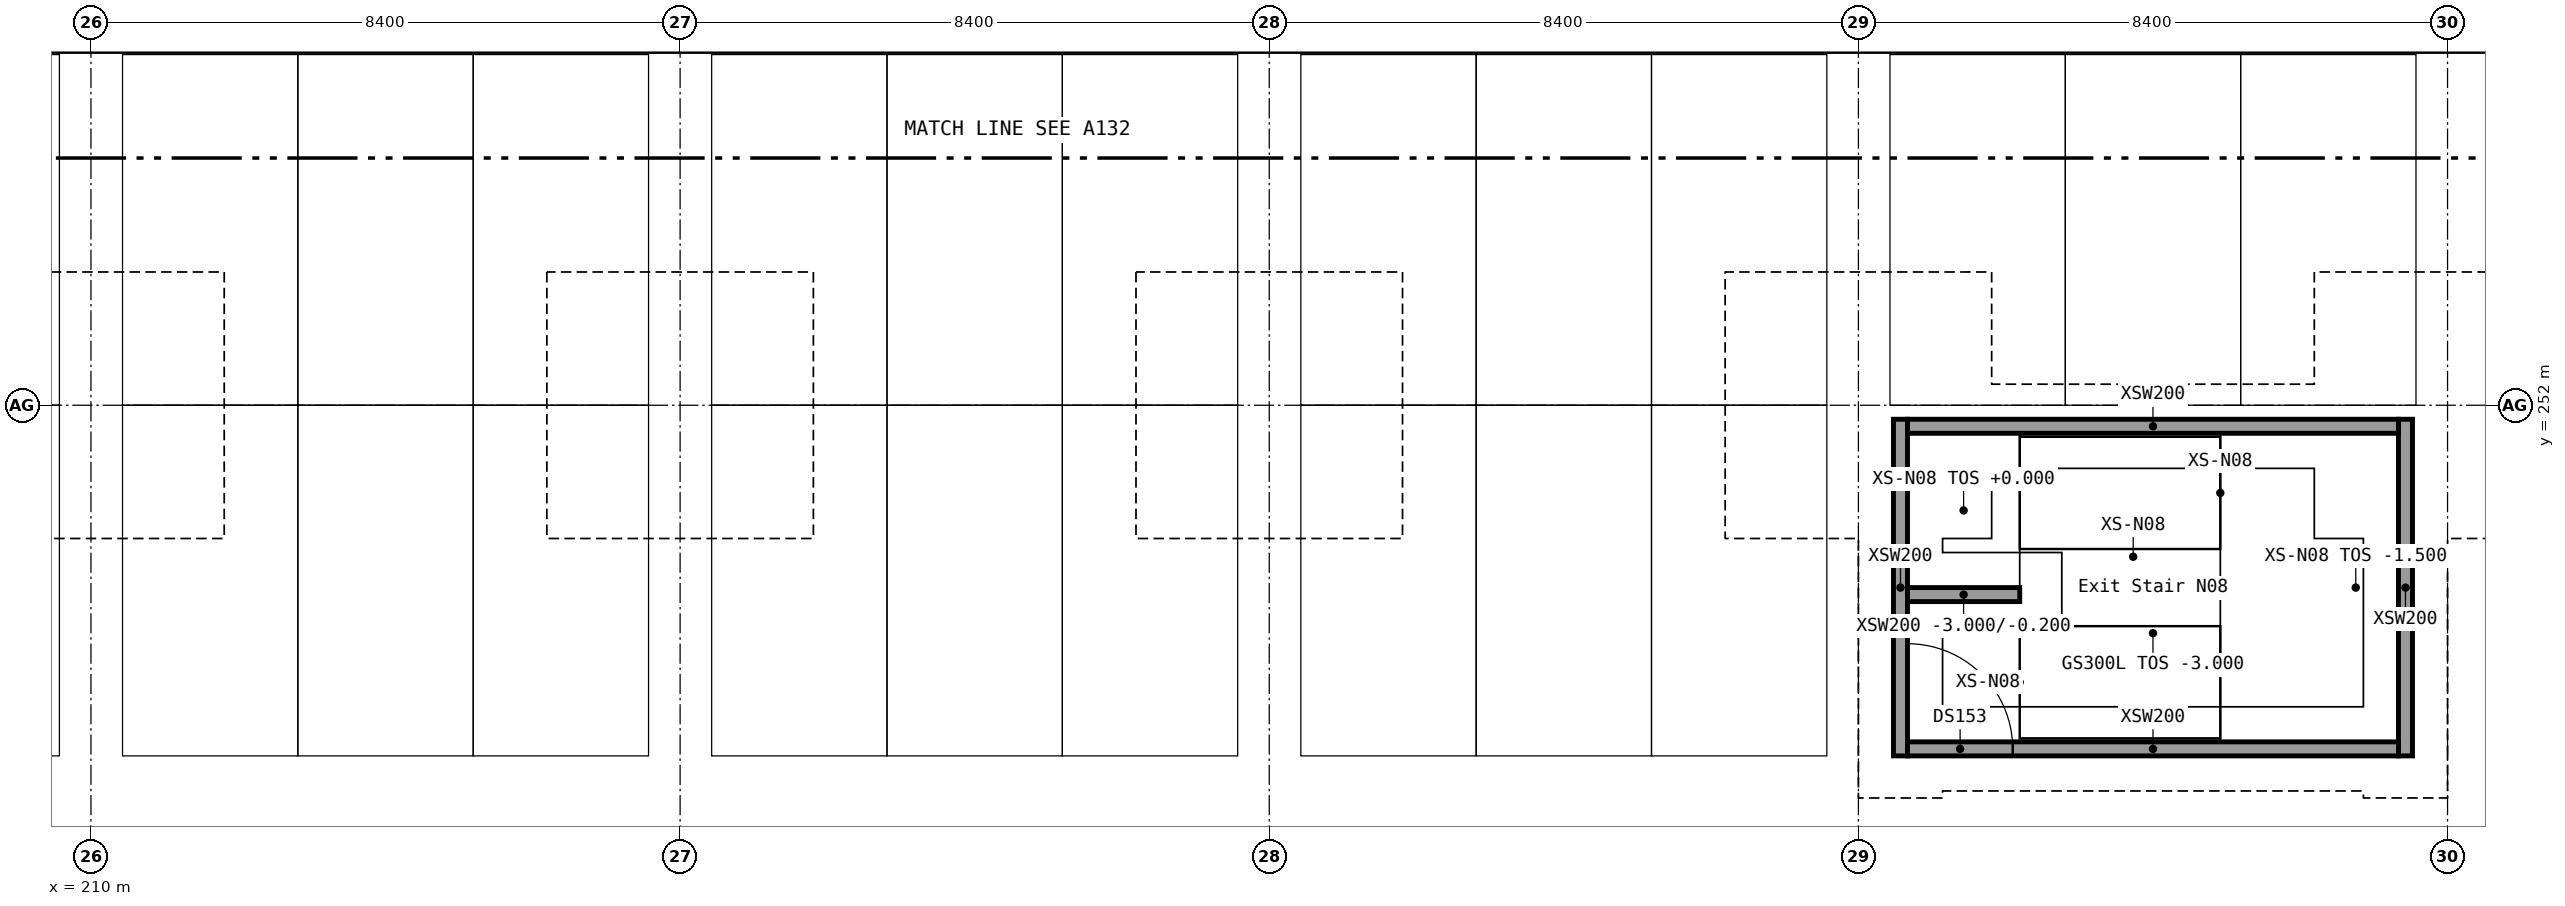
"""IFC4 building model, lengths in metres.
Left out: names, types, materials, properties, quantities, classifications, styles, units other than length and angle.
Written with IfcOpenShell. Run it as: python <this file> out.ifc"""

import sys

from ifc_helpers import new_model, si_unit, direction, frame, frame_2d, origin, origin_2d, place, context, subcontext, project, spatial, rectangle, extrude, element, fill, save


model = new_model("IFC4")
c1 = context("Model", 3, precision=1e-05, world=origin(), true_north=direction((0.0, 1.0)))
c2 = subcontext(c1, "Body", "Model", "MODEL_VIEW")
j1 = project(units=[si_unit("LENGTHUNIT", "METRE"), si_unit("PLANEANGLEUNIT", "RADIAN")], contexts=[c1])
p1 = place(None, origin())
s1 = spatial("IfcSite", under=j1, at=p1, CompositionType="ELEMENT")
p2 = place(p1, origin())
s2 = spatial("IfcBuilding", under=s1, at=p2, CompositionType="ELEMENT")
p3 = place(p2, frame((0.0, 0.0, -3.0)))
s3 = spatial("IfcBuildingStorey", under=s2, at=p3, CompositionType="ELEMENT", Elevation=-3.0)
for number, where, z_axis, x_axis in (
    (1, (235.8, 247.0, 0.0), (0.0, 0.0, 1.0), (0.0, 1.0, 0.0)),
    (2, (243.0, 247.0, 0.0), (0.0, 0.0, 1.0), (0.0, 1.0, 0.0)),
):
    element("IfcWall", number, at=place(p3, frame(where, z_axis=z_axis, x_axis=x_axis)), inside=s3, PredefinedType="SOLIDWALL", context=c2, shape_type="SweptSolid", body=[
        extrude(rectangle(XDim=4.8, YDim=0.2, at=frame_2d((2.4, 0.0))), origin(), (0.0, 0.0, 1.0), 3.0),
    ])
p4 = place(p3, frame((235.9, 247.1, 0.0), z_axis=(0.0, 0.0, 1.0), x_axis=(1.0, 0.0, 0.0)))
e3 = element("IfcWall", 3, at=p4, inside=s3, PredefinedType="SOLIDWALL", context=c2, shape_type="SweptSolid", body=[
    extrude(rectangle(XDim=7.0, YDim=0.2, at=frame_2d((3.5, 0.0))), origin(), (0.0, 0.0, 1.0), 3.0),
])
p5 = place(p4, origin())
e4 = element("IfcOpeningElement", 4, at=p5, cuts=e3, PredefinedType="OPENING", context=c2, shape_type="SweptSolid", body=[
    extrude(rectangle(XDim=1.5, YDim=2.1, at=frame_2d((0.75, 1.05))), frame((0.0, 0.1, 0.0), z_axis=(0.0, -1.0, 0.0), x_axis=(1.0, 0.0, 0.0)), (0.0, 0.0, 1.0), 0.2),
])
p6 = place(p3, frame((235.9, 251.7, 0.0), z_axis=(0.0, 0.0, 1.0), x_axis=(1.0, 0.0, 0.0)))
e5 = element("IfcWall", 5, at=p6, inside=s3, PredefinedType="SOLIDWALL", context=c2, shape_type="SweptSolid", body=[
    extrude(rectangle(XDim=7.0, YDim=0.2, at=frame_2d((3.5, 0.0))), origin(), (0.0, 0.0, 1.0), 3.0),
])
p7 = place(p3, frame((235.9, 249.3, 0.0), z_axis=(0.0, 0.0, 1.0), x_axis=(1.0, 0.0, 0.0)))
e6 = element("IfcWall", 6, at=p7, inside=s3, PredefinedType="SOLIDWALL", context=c2, shape_type="SweptSolid", body=[
    extrude(rectangle(XDim=1.6, YDim=0.2, at=frame_2d((0.8, 0.0))), origin(), (0.0, 0.0, 1.0), 2.8),
])
for number, where, z_axis, x_axis in (
    (7, (210.0, 252.0, 0.0), (0.0, 0.0, 1.0), (1.0, 0.0, 0.0)),
    (8, (218.4, 252.0, 0.0), (0.0, 0.0, 1.0), (1.0, 0.0, 0.0)),
    (9, (226.8, 252.0, 0.0), (0.0, 0.0, 1.0), (1.0, 0.0, 0.0)),
    (10, (235.2, 252.0, 0.0), (0.0, 0.0, 1.0), (1.0, 0.0, 0.0)),
    (11, (243.6, 252.0, 0.0), (0.0, 0.0, 1.0), (1.0, 0.0, 0.0)),
):
    element("IfcColumn", number, at=place(p3, frame(where, z_axis=z_axis, x_axis=x_axis)), inside=s3, PredefinedType="COLUMN", context=c2, shape_type="SweptSolid", body=[
        extrude(rectangle(XDim=0.8, YDim=0.8, at=origin_2d()), origin(), (0.0, 0.0, 1.0), 2.4),
    ])
p8 = place(p5, origin())
e12 = element("IfcDoor", 12, at=p8, inside=s3, OperationType="SINGLE_SWING_LEFT", PredefinedType="DOOR", context=c2, shape_type="SweptSolid", body=[
    extrude(rectangle(XDim=1.5, YDim=2.1, at=frame_2d((0.75, 1.05))), frame((0.0, 0.025, 0.0), z_axis=(0.0, -1.0, 0.0), x_axis=(1.0, 0.0, 0.0)), (0.0, 0.0, 1.0), 0.05),
])
fill(e4, e12)
save(model, sys.argv[1])
